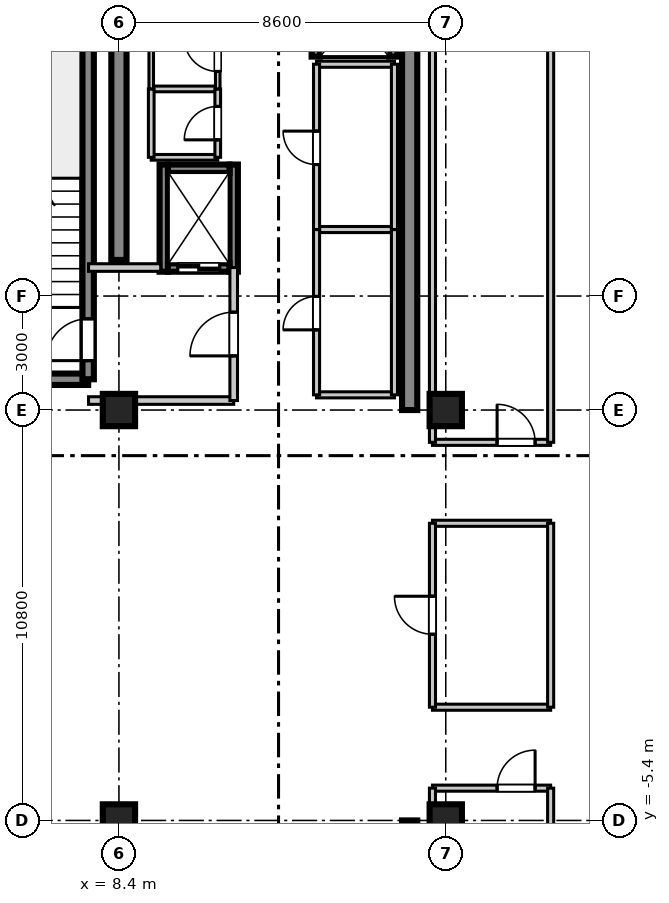
"""IFC4 building model, lengths in metres.
Left out: names, types, materials, properties, quantities, classifications, styles, units other than length and angle.
Written with IfcOpenShell. Run it as: python <this file> out.ifc"""

import sys

from ifc_helpers import new_model, si_unit, direction, frame, frame_2d, origin, origin_2d, place, context, subcontext, project, spatial, rectangle, extrude, source, transform, mapped, element, fill, save


model = new_model("IFC4")
c1 = context("Model", 3, precision=1e-05, world=origin(), true_north=direction((0.0, 1.0)))
c2 = subcontext(c1, "Body", "Model", "MODEL_VIEW")
j1 = project(units=[si_unit("LENGTHUNIT", "METRE"), si_unit("PLANEANGLEUNIT", "RADIAN")], contexts=[c1])
p1 = place(None, origin())
s1 = spatial("IfcSite", under=j1, at=p1, CompositionType="ELEMENT")
p2 = place(p1, origin())
s2 = spatial("IfcBuilding", under=s1, at=p2, CompositionType="ELEMENT")
p3 = place(p2, frame((0.0, 0.0, 334.75)))
s3 = spatial("IfcBuildingStorey", under=s2, at=p3, CompositionType="ELEMENT", Elevation=334.75)
m1 = source(origin(), c2, "Body", "SweptSolid", [
    extrude(rectangle(XDim=0.85, YDim=0.85, at=origin_2d()), origin(), (0.0, 0.0, 1.0), 3.755),
])
for number, where, z_axis, x_axis in (
    (1, (8.4, -5.4, 0.0), (0.0, 0.0, 1.0), (1.0, 0.0, 0.0)),
    (2, (8.4, 5.4, 0.0), (0.0, 0.0, 1.0), (1.0, 0.0, 0.0)),
    (3, (17.0, -5.4, 0.0), (0.0, 0.0, 1.0), (1.0, 0.0, 0.0)),
    (4, (17.0, 5.4, 0.0), (0.0, 0.0, 1.0), (1.0, 0.0, 0.0)),
):
    element("IfcColumn", number, at=place(p3, frame(where, z_axis=z_axis, x_axis=x_axis)), inside=s3, PredefinedType="PILASTER", context=c2, shape_type="MappedRepresentation", body=[
        mapped(m1, transform((0.0, 0.0, 0.0), scale=1.0)),
    ])
m2 = source(origin(), c2, "Body", "SweptSolid", [
    extrude(rectangle(XDim=7.65, YDim=0.4, at=frame_2d((3.825, 0.0))), origin(), (0.0, 0.0, 1.0), 3.47),
])
p4 = place(p3, frame((8.4, 9.35, 0.0), z_axis=(0.0, 0.0, 1.0), x_axis=(0.0, 1.0, 0.0)))
e5 = element("IfcWall", 5, at=p4, inside=s3, PredefinedType="SHEAR", context=c2, shape_type="MappedRepresentation", body=[
    mapped(m2, transform((0.0, 0.0, 0.0), scale=1.0)),
])
m3 = source(origin(), c2, "Body", "SweptSolid", [
    extrude(rectangle(XDim=11.6, YDim=0.4, at=frame_2d((5.8, 0.0))), origin(), (0.0, 0.0, 1.0), 3.47),
])
for number, where, z_axis, x_axis in (
    (6, (16.05, 5.4, 0.0), (0.0, 0.0, 1.0), (0.0, 1.0, 0.0)),
    (7, (16.05, -17.0, 0.0), (0.0, 0.0, 1.0), (0.0, 1.0, 0.0)),
):
    element("IfcWall", number, at=place(p3, frame(where, z_axis=z_axis, x_axis=x_axis)), inside=s3, PredefinedType="SHEAR", context=c2, shape_type="MappedRepresentation", body=[
        mapped(m3, transform((0.0, 0.0, 0.0), scale=1.0)),
    ])
m4 = source(origin(), c2, "Body", "SweptSolid", [
    extrude(rectangle(XDim=3.98, YDim=0.3, at=frame_2d((1.99, 0.0))), origin(), (0.0, 0.0, 1.0), 3.47),
])
p5 = place(p3, frame((3.61, 6.21, 0.0), z_axis=(0.0, 0.0, 1.0), x_axis=(1.0, 0.0, 0.0)))
e8 = element("IfcWall", 8, at=p5, inside=s3, PredefinedType="SHEAR", context=c2, shape_type="MappedRepresentation", body=[
    mapped(m4, transform((0.0, 0.0, 0.0), scale=1.0)),
])
m5 = source(origin(), c2, "Body", "SweptSolid", [
    extrude(rectangle(XDim=9.38, YDim=0.3, at=frame_2d((4.69, 0.0))), origin(), (0.0, 0.0, 1.0), 3.47),
])
p6 = place(p3, frame((7.59, 6.21, 0.0), z_axis=(0.0, 0.0, 1.0), x_axis=(0.0, 1.0, 0.0)))
e9 = element("IfcWall", 9, at=p6, inside=s3, PredefinedType="SHEAR", context=c2, shape_type="MappedRepresentation", body=[
    mapped(m5, transform((0.0, 0.0, 0.0), scale=1.0)),
])
p7 = place(p6, frame((0.49, 0.0, 0.0)))
e10 = element("IfcOpeningElement", 10, at=p7, cuts=e9, PredefinedType="OPENING", context=c2, shape_type="SweptSolid", body=[
    extrude(rectangle(XDim=1.1, YDim=2.15, at=frame_2d((0.55, 1.075))), frame((0.0, 0.16, 0.0), z_axis=(0.0, -1.0, 0.0), x_axis=(1.0, 0.0, 0.0)), (0.0, 0.0, 1.0), 0.32),
])
m6 = source(origin(), c2, "Body", "SweptSolid", [
    extrude(rectangle(XDim=2.82, YDim=0.22, at=frame_2d((1.41, 0.0))), origin(), (0.0, 0.0, 1.0), 3.47),
])
for number, where, z_axis, x_axis in (
    (11, (9.58, 9.04, 0.0), (0.0, 0.0, 1.0), (0.0, 1.0, 0.0)),
    (12, (11.42, 9.04, 0.0), (0.0, 0.0, 1.0), (0.0, 1.0, 0.0)),
):
    element("IfcWall", number, at=place(p3, frame(where, z_axis=z_axis, x_axis=x_axis)), inside=s3, PredefinedType="SHEAR", context=c2, shape_type="MappedRepresentation", body=[
        mapped(m6, transform((0.0, 0.0, 0.0), scale=1.0)),
    ])
m7 = source(origin(), c2, "Body", "SweptSolid", [
    extrude(rectangle(XDim=1.62, YDim=0.22, at=frame_2d((0.81, 0.0))), origin(), (0.0, 0.0, 1.0), 3.47),
])
p8 = place(p3, frame((9.69, 9.15, 0.0), z_axis=(0.0, 0.0, 1.0), x_axis=(1.0, 0.0, 0.0)))
e13 = element("IfcWall", 13, at=p8, inside=s3, PredefinedType="SHEAR", context=c2, shape_type="MappedRepresentation", body=[
    mapped(m7, transform((0.0, 0.0, 0.0), scale=1.0)),
])
p9 = place(p8, frame((0.26, 0.0, 0.0)))
e14 = element("IfcOpeningElement", 14, at=p9, cuts=e13, PredefinedType="OPENING", context=c2, shape_type="SweptSolid", body=[
    extrude(rectangle(XDim=1.1, YDim=2.2, at=frame_2d((0.55, 1.1))), frame((0.0, 0.12, 0.0), z_axis=(0.0, -1.0, 0.0), x_axis=(1.0, 0.0, 0.0)), (0.0, 0.0, 1.0), 0.24),
])
p10 = place(p3, frame((9.69, 11.75, 0.0), z_axis=(0.0, 0.0, 1.0), x_axis=(1.0, 0.0, 0.0)))
e15 = element("IfcWall", 15, at=p10, inside=s3, PredefinedType="SHEAR", context=c2, shape_type="MappedRepresentation", body=[
    mapped(m7, transform((0.0, 0.0, 0.0), scale=1.0)),
])
m8 = source(origin(), c2, "Body", "SweptSolid", [
    extrude(rectangle(XDim=2.61, YDim=0.22, at=frame_2d((1.305, 0.0))), origin(), (0.0, 0.0, 1.0), 3.47),
])
p11 = place(p3, frame((13.58, 14.7, 0.0), z_axis=(0.0, 0.0, 1.0), x_axis=(0.0, 1.0, 0.0)))
e16 = element("IfcWall", 16, at=p11, inside=s3, PredefinedType="SHEAR", context=c2, shape_type="MappedRepresentation", body=[
    mapped(m8, transform((0.0, 0.0, 0.0), scale=1.0)),
])
p12 = place(p11, frame((0.6, 0.0, 0.0)))
e17 = element("IfcOpeningElement", 17, at=p12, cuts=e16, PredefinedType="OPENING", context=c2, shape_type="SweptSolid", body=[
    extrude(rectangle(XDim=1.2, YDim=2.2, at=frame_2d((0.6, 1.1))), frame((0.0, 0.12, 0.0), z_axis=(0.0, -1.0, 0.0), x_axis=(1.0, 0.0, 0.0)), (0.0, 0.0, 1.0), 0.24),
])
p13 = place(p3, frame((15.62, 14.7, 0.0), z_axis=(0.0, 0.0, 1.0), x_axis=(0.0, 1.0, 0.0)))
e18 = element("IfcWall", 18, at=p13, inside=s3, PredefinedType="SHEAR", context=c2, shape_type="MappedRepresentation", body=[
    mapped(m8, transform((0.0, 0.0, 0.0), scale=1.0)),
])
m9 = source(origin(), c2, "Body", "SweptSolid", [
    extrude(rectangle(XDim=3.82, YDim=0.2, at=frame_2d((1.91, 0.0))), origin(), (0.0, 0.0, 1.0), 2.81),
])
p14 = place(p3, frame((7.6, 5.65, 0.0), z_axis=(0.0, 0.0, 1.0), x_axis=(1.0, 0.0, 0.0)))
e19 = element("IfcWall", 19, at=p14, inside=s3, PredefinedType="PARTITIONING", context=c2, shape_type="MappedRepresentation", body=[
    mapped(m9, transform((0.0, 0.0, 0.0), scale=1.0)),
])
m10 = source(origin(), c2, "Body", "SweptSolid", [
    extrude(rectangle(XDim=1.9, YDim=0.2, at=frame_2d((0.95, 0.0))), origin(), (0.0, 0.0, 1.0), 2.81),
])
p15 = place(p3, frame((7.6, 9.15, 0.0), z_axis=(0.0, 0.0, 1.0), x_axis=(1.0, 0.0, 0.0)))
e20 = element("IfcWall", 20, at=p15, inside=s3, PredefinedType="PARTITIONING", context=c2, shape_type="MappedRepresentation", body=[
    mapped(m10, transform((0.0, 0.0, 0.0), scale=1.0)),
])
m11 = source(origin(), c2, "Body", "SweptSolid", [
    extrude(rectangle(XDim=3.5, YDim=0.2, at=frame_2d((1.75, 0.0))), origin(), (0.0, 0.0, 1.0), 2.81),
])
p16 = place(p3, frame((11.42, 5.65, 0.0), z_axis=(0.0, 0.0, 1.0), x_axis=(0.0, 1.0, 0.0)))
e21 = element("IfcWall", 21, at=p16, inside=s3, PredefinedType="PARTITIONING", context=c2, shape_type="MappedRepresentation", body=[
    mapped(m11, transform((0.0, 0.0, 0.0), scale=1.0)),
])
p17 = place(p16, frame((1.175, 0.0, 0.0)))
e22 = element("IfcOpeningElement", 22, at=p17, cuts=e21, PredefinedType="OPENING", context=c2, shape_type="SweptSolid", body=[
    extrude(rectangle(XDim=1.15, YDim=2.15, at=frame_2d((0.575, 1.075))), frame((0.0, 0.11, 0.0), z_axis=(0.0, -1.0, 0.0), x_axis=(1.0, 0.0, 0.0)), (0.0, 0.0, 1.0), 0.22),
])
m12 = source(origin(), c2, "Body", "SweptSolid", [
    extrude(rectangle(XDim=1.75, YDim=0.15, at=frame_2d((0.875, 0.0))), origin(), (0.0, 0.0, 1.0), 2.81),
])
for number, where, z_axis, x_axis in (
    (23, (9.25, 12.05, 0.0), (0.0, 0.0, 1.0), (1.0, 0.0, 0.0)),
    (24, (9.25, 13.85, 0.0), (0.0, 0.0, 1.0), (1.0, 0.0, 0.0)),
):
    element("IfcWall", number, at=place(p3, frame(where, z_axis=z_axis, x_axis=x_axis)), inside=s3, PredefinedType="PARTITIONING", context=c2, shape_type="MappedRepresentation", body=[
        mapped(m12, transform((0.0, 0.0, 0.0), scale=1.0)),
    ])
m13 = source(origin(), c2, "Body", "SweptSolid", [
    extrude(rectangle(XDim=1.8, YDim=0.15, at=frame_2d((0.9, 0.0))), origin(), (0.0, 0.0, 1.0), 2.81),
])
p18 = place(p3, frame((9.25, 12.05, 0.0), z_axis=(0.0, 0.0, 1.0), x_axis=(0.0, 1.0, 0.0)))
e25 = element("IfcWall", 25, at=p18, inside=s3, PredefinedType="PARTITIONING", context=c2, shape_type="MappedRepresentation", body=[
    mapped(m13, transform((0.0, 0.0, 0.0), scale=1.0)),
])
p19 = place(p3, frame((11.0, 12.05, 0.0), z_axis=(0.0, 0.0, 1.0), x_axis=(0.0, 1.0, 0.0)))
e26 = element("IfcWall", 26, at=p19, inside=s3, PredefinedType="PARTITIONING", context=c2, shape_type="MappedRepresentation", body=[
    mapped(m13, transform((0.0, 0.0, 0.0), scale=1.0)),
])
p20 = place(p19, frame((0.46, 0.0, 0.0)))
e27 = element("IfcOpeningElement", 27, at=p20, cuts=e26, PredefinedType="OPENING", context=c2, shape_type="SweptSolid", body=[
    extrude(rectangle(XDim=0.88, YDim=2.1, at=frame_2d((0.44, 1.05))), frame((0.0, 0.085, 0.0), z_axis=(0.0, -1.0, 0.0), x_axis=(1.0, 0.0, 0.0)), (0.0, 0.0, 1.0), 0.17),
])
m14 = source(origin(), c2, "Body", "SweptSolid", [
    extrude(rectangle(XDim=1.8, YDim=0.12, at=frame_2d((0.9, 0.0))), origin(), (0.0, 0.0, 1.0), 2.81),
])
p21 = place(p3, frame((9.25, 13.85, 0.0), z_axis=(0.0, 0.0, 1.0), x_axis=(0.0, 1.0, 0.0)))
e28 = element("IfcWall", 28, at=p21, inside=s3, PredefinedType="PARTITIONING", context=c2, shape_type="MappedRepresentation", body=[
    mapped(m14, transform((0.0, 0.0, 0.0), scale=1.0)),
])
p22 = place(p3, frame((11.0, 13.85, 0.0), z_axis=(0.0, 0.0, 1.0), x_axis=(0.0, 1.0, 0.0)))
e29 = element("IfcWall", 29, at=p22, inside=s3, PredefinedType="PARTITIONING", context=c2, shape_type="MappedRepresentation", body=[
    mapped(m14, transform((0.0, 0.0, 0.0), scale=1.0)),
])
p23 = place(p22, frame((0.46, 0.0, 0.0)))
e30 = element("IfcOpeningElement", 30, at=p23, cuts=e29, PredefinedType="OPENING", context=c2, shape_type="SweptSolid", body=[
    extrude(rectangle(XDim=0.88, YDim=2.1, at=frame_2d((0.44, 1.05))), frame((0.0, 0.07, 0.0), z_axis=(0.0, -1.0, 0.0), x_axis=(1.0, 0.0, 0.0)), (0.0, 0.0, 1.0), 0.14),
])
m15 = source(origin(), c2, "Body", "SweptSolid", [
    extrude(rectangle(XDim=2.05, YDim=0.16, at=frame_2d((1.025, 0.0))), origin(), (0.0, 0.0, 1.0), 2.81),
])
for number, where, z_axis, x_axis in (
    (31, (13.6, 5.8, 0.0), (0.0, 0.0, 1.0), (1.0, 0.0, 0.0)),
    (32, (13.6, 10.15, 0.0), (0.0, 0.0, 1.0), (1.0, 0.0, 0.0)),
):
    element("IfcWall", number, at=place(p3, frame(where, z_axis=z_axis, x_axis=x_axis)), inside=s3, PredefinedType="PARTITIONING", context=c2, shape_type="MappedRepresentation", body=[
        mapped(m15, transform((0.0, 0.0, 0.0), scale=1.0)),
    ])
m16 = source(origin(), c2, "Body", "SweptSolid", [
    extrude(rectangle(XDim=4.35, YDim=0.16, at=frame_2d((2.175, 0.0))), origin(), (0.0, 0.0, 1.0), 2.81),
])
p24 = place(p3, frame((13.6, 5.8, 0.0), z_axis=(0.0, 0.0, 1.0), x_axis=(0.0, 1.0, 0.0)))
e33 = element("IfcWall", 33, at=p24, inside=s3, PredefinedType="PARTITIONING", context=c2, shape_type="MappedRepresentation", body=[
    mapped(m16, transform((0.0, 0.0, 0.0), scale=1.0)),
])
p25 = place(p24, frame((1.71, 0.0, 0.0)))
e34 = element("IfcOpeningElement", 34, at=p25, cuts=e33, PredefinedType="OPENING", context=c2, shape_type="SweptSolid", body=[
    extrude(rectangle(XDim=0.88, YDim=2.1, at=frame_2d((0.44, 1.05))), frame((0.0, 0.09, 0.0), z_axis=(0.0, -1.0, 0.0), x_axis=(1.0, 0.0, 0.0)), (0.0, 0.0, 1.0), 0.18),
])
p26 = place(p3, frame((15.65, 5.8, 0.0), z_axis=(0.0, 0.0, 1.0), x_axis=(0.0, 1.0, 0.0)))
e35 = element("IfcWall", 35, at=p26, inside=s3, PredefinedType="PARTITIONING", context=c2, shape_type="MappedRepresentation", body=[
    mapped(m16, transform((0.0, 0.0, 0.0), scale=1.0)),
])
p27 = place(p3, frame((13.6, 14.5, 0.0), z_axis=(0.0, 0.0, 1.0), x_axis=(1.0, 0.0, 0.0)))
e36 = element("IfcWall", 36, at=p27, inside=s3, PredefinedType="PARTITIONING", context=c2, shape_type="MappedRepresentation", body=[
    mapped(m15, transform((0.0, 0.0, 0.0), scale=1.0)),
])
m17 = source(origin(), c2, "Body", "SweptSolid", [
    extrude(rectangle(XDim=4.35, YDim=0.16, at=frame_2d((2.175, 0.0))), origin(), (0.0, 0.0, 1.0), 2.81),
])
p28 = place(p3, frame((13.6, 10.15, 0.0), z_axis=(0.0, 0.0, 1.0), x_axis=(0.0, 1.0, 0.0)))
e37 = element("IfcWall", 37, at=p28, inside=s3, PredefinedType="PARTITIONING", context=c2, shape_type="MappedRepresentation", body=[
    mapped(m17, transform((0.0, 0.0, 0.0), scale=1.0)),
])
p29 = place(p28, frame((1.71, 0.0, 0.0)))
e38 = element("IfcOpeningElement", 38, at=p29, cuts=e37, PredefinedType="OPENING", context=c2, shape_type="SweptSolid", body=[
    extrude(rectangle(XDim=0.88, YDim=2.1, at=frame_2d((0.44, 1.05))), frame((0.0, 0.09, 0.0), z_axis=(0.0, -1.0, 0.0), x_axis=(1.0, 0.0, 0.0)), (0.0, 0.0, 1.0), 0.18),
])
p30 = place(p3, frame((15.65, 10.15, 0.0), z_axis=(0.0, 0.0, 1.0), x_axis=(0.0, 1.0, 0.0)))
e39 = element("IfcWall", 39, at=p30, inside=s3, PredefinedType="PARTITIONING", context=c2, shape_type="MappedRepresentation", body=[
    mapped(m17, transform((0.0, 0.0, 0.0), scale=1.0)),
])
m18 = source(origin(), c2, "Body", "SweptSolid", [
    extrude(rectangle(XDim=3.11, YDim=0.16, at=frame_2d((1.555, 0.0))), origin(), (0.0, 0.0, 1.0), 2.81),
])
p31 = place(p3, frame((16.65, 4.55, 0.0), z_axis=(0.0, 0.0, 1.0), x_axis=(1.0, 0.0, 0.0)))
e40 = element("IfcWall", 40, at=p31, inside=s3, PredefinedType="PARTITIONING", context=c2, shape_type="MappedRepresentation", body=[
    mapped(m18, transform((0.0, 0.0, 0.0), scale=1.0)),
])
p32 = place(p31, frame((1.701, 0.0, 0.0)))
e41 = element("IfcOpeningElement", 41, at=p32, cuts=e40, PredefinedType="OPENING", context=c2, shape_type="SweptSolid", body=[
    extrude(rectangle(XDim=1.0, YDim=2.1, at=frame_2d((0.5, 1.05))), frame((0.0, 0.09, 0.0), z_axis=(0.0, -1.0, 0.0), x_axis=(1.0, 0.0, 0.0)), (0.0, 0.0, 1.0), 0.18),
])
m19 = source(origin(), c2, "Body", "SweptSolid", [
    extrude(rectangle(XDim=17.95, YDim=0.16, at=frame_2d((8.975, 0.0))), origin(), (0.0, 0.0, 1.0), 2.81),
])
p33 = place(p3, frame((16.65, 4.55, 0.0), z_axis=(0.0, 0.0, 1.0), x_axis=(0.0, 1.0, 0.0)))
e42 = element("IfcWall", 42, at=p33, inside=s3, PredefinedType="PARTITIONING", context=c2, shape_type="MappedRepresentation", body=[
    mapped(m19, transform((0.0, 0.0, 0.0), scale=1.0)),
])
m20 = source(origin(), c2, "Body", "SweptSolid", [
    extrude(rectangle(XDim=16.53, YDim=0.16, at=frame_2d((8.265, 0.0))), origin(), (0.0, 0.0, 1.0), 2.81),
])
p34 = place(p3, frame((19.76, 4.55, 0.0), z_axis=(0.0, 0.0, 1.0), x_axis=(0.0, 1.0, 0.0)))
e43 = element("IfcWall", 43, at=p34, inside=s3, PredefinedType="PARTITIONING", context=c2, shape_type="MappedRepresentation", body=[
    mapped(m20, transform((0.0, 0.0, 0.0), scale=1.0)),
])
p35 = place(p3, frame((16.65, -4.55, 0.0), z_axis=(0.0, 0.0, 1.0), x_axis=(1.0, 0.0, 0.0)))
e44 = element("IfcWall", 44, at=p35, inside=s3, PredefinedType="PARTITIONING", context=c2, shape_type="MappedRepresentation", body=[
    mapped(m18, transform((0.0, 0.0, 0.0), scale=1.0)),
])
p36 = place(p35, frame((1.701, 0.0, 0.0)))
e45 = element("IfcOpeningElement", 45, at=p36, cuts=e44, PredefinedType="OPENING", context=c2, shape_type="SweptSolid", body=[
    extrude(rectangle(XDim=1.0, YDim=2.1, at=frame_2d((0.5, 1.05))), frame((0.0, 0.09, 0.0), z_axis=(0.0, -1.0, 0.0), x_axis=(1.0, 0.0, 0.0)), (0.0, 0.0, 1.0), 0.18),
])
p37 = place(p3, frame((16.65, -22.5, 0.0), z_axis=(0.0, 0.0, 1.0), x_axis=(0.0, 1.0, 0.0)))
e46 = element("IfcWall", 46, at=p37, inside=s3, PredefinedType="PARTITIONING", context=c2, shape_type="MappedRepresentation", body=[
    mapped(m19, transform((0.0, 0.0, 0.0), scale=1.0)),
])
p38 = place(p3, frame((19.76, -21.08, 0.0), z_axis=(0.0, 0.0, 1.0), x_axis=(0.0, 1.0, 0.0)))
e47 = element("IfcWall", 47, at=p38, inside=s3, PredefinedType="PARTITIONING", context=c2, shape_type="MappedRepresentation", body=[
    mapped(m20, transform((0.0, 0.0, 0.0), scale=1.0)),
])
for number, where, z_axis, x_axis in (
    (48, (16.65, -2.42, 0.0), (0.0, 0.0, 1.0), (1.0, 0.0, 0.0)),
    (49, (16.65, 2.42, 0.0), (0.0, 0.0, 1.0), (1.0, 0.0, 0.0)),
):
    element("IfcWall", number, at=place(p3, frame(where, z_axis=z_axis, x_axis=x_axis)), inside=s3, PredefinedType="PARTITIONING", context=c2, shape_type="MappedRepresentation", body=[
        mapped(m18, transform((0.0, 0.0, 0.0), scale=1.0)),
    ])
m21 = source(origin(), c2, "Body", "SweptSolid", [
    extrude(rectangle(XDim=4.84, YDim=0.16, at=frame_2d((2.42, 0.0))), origin(), (0.0, 0.0, 1.0), 2.81),
])
p39 = place(p3, frame((16.65, -2.42, 0.0), z_axis=(0.0, 0.0, 1.0), x_axis=(0.0, 1.0, 0.0)))
e50 = element("IfcWall", 50, at=p39, inside=s3, PredefinedType="PARTITIONING", context=c2, shape_type="MappedRepresentation", body=[
    mapped(m21, transform((0.0, 0.0, 0.0), scale=1.0)),
])
p40 = place(p39, frame((1.92, 0.0, 0.0)))
e51 = element("IfcOpeningElement", 51, at=p40, cuts=e50, PredefinedType="OPENING", context=c2, shape_type="SweptSolid", body=[
    extrude(rectangle(XDim=1.0, YDim=2.1, at=frame_2d((0.5, 1.05))), frame((0.0, 0.09, 0.0), z_axis=(0.0, -1.0, 0.0), x_axis=(1.0, 0.0, 0.0)), (0.0, 0.0, 1.0), 0.18),
])
p41 = place(p3, frame((19.76, -2.42, 0.0), z_axis=(0.0, 0.0, 1.0), x_axis=(0.0, 1.0, 0.0)))
e52 = element("IfcWall", 52, at=p41, inside=s3, PredefinedType="PARTITIONING", context=c2, shape_type="MappedRepresentation", body=[
    mapped(m21, transform((0.0, 0.0, 0.0), scale=1.0)),
])
m22 = source(origin(), c2, "Body", "SweptSolid", [
    extrude(rectangle(XDim=1.1, YDim=2.15, at=frame_2d((0.55, 1.075))), frame((0.0, 0.025, 0.0), z_axis=(0.0, -1.0, 0.0), x_axis=(1.0, 0.0, 0.0)), (0.0, 0.0, 1.0), 0.05),
])
p42 = place(p7, origin())
e53 = element("IfcDoor", 53, at=p42, inside=s3, OperationType="SINGLE_SWING_LEFT", PredefinedType="DOOR", context=c2, shape_type="MappedRepresentation", body=[
    mapped(m22, transform((0.0, 0.0, 0.0), scale=1.0)),
])
fill(e10, e53)
m23 = source(origin(), c2, "Body", "SweptSolid", [
    extrude(rectangle(XDim=1.1, YDim=2.2, at=frame_2d((0.55, 1.1))), frame((0.0, 0.025, 0.0), z_axis=(0.0, -1.0, 0.0), x_axis=(1.0, 0.0, 0.0)), (0.0, 0.0, 1.0), 0.05),
])
p43 = place(p9, frame((1.1, 0.0, 0.0), z_axis=(0.0, 0.0, 1.0), x_axis=(-1.0, 0.0, 0.0)))
e54 = element("IfcDoor", 54, at=p43, inside=s3, OperationType="DOUBLE_DOOR_SLIDING", PredefinedType="DOOR", context=c2, shape_type="MappedRepresentation", body=[
    mapped(m23, transform((0.0, 0.0, 0.0), scale=1.0)),
])
fill(e14, e54)
m24 = source(origin(), c2, "Body", "SweptSolid", [
    extrude(rectangle(XDim=1.15, YDim=2.15, at=frame_2d((0.575, 1.075))), frame((0.0, 0.025, 0.0), z_axis=(0.0, -1.0, 0.0), x_axis=(1.0, 0.0, 0.0)), (0.0, 0.0, 1.0), 0.05),
])
p44 = place(p17, frame((1.15, 0.0, 0.0), z_axis=(0.0, 0.0, 1.0), x_axis=(-1.0, 0.0, 0.0)))
e55 = element("IfcDoor", 55, at=p44, inside=s3, OperationType="SINGLE_SWING_LEFT", PredefinedType="DOOR", context=c2, shape_type="MappedRepresentation", body=[
    mapped(m24, transform((0.0, 0.0, 0.0), scale=1.0)),
])
fill(e22, e55)
m25 = source(origin(), c2, "Body", "SweptSolid", [
    extrude(rectangle(XDim=0.88, YDim=2.1, at=frame_2d((0.44, 1.05))), frame((0.0, 0.025, 0.0), z_axis=(0.0, -1.0, 0.0), x_axis=(1.0, 0.0, 0.0)), (0.0, 0.0, 1.0), 0.05),
])
p45 = place(p20, origin())
e56 = element("IfcDoor", 56, at=p45, inside=s3, OperationType="SINGLE_SWING_LEFT", PredefinedType="DOOR", context=c2, shape_type="MappedRepresentation", body=[
    mapped(m25, transform((0.0, 0.0, 0.0), scale=1.0)),
])
fill(e27, e56)
p46 = place(p23, origin())
e57 = element("IfcDoor", 57, at=p46, inside=s3, OperationType="SINGLE_SWING_RIGHT", PredefinedType="DOOR", context=c2, shape_type="MappedRepresentation", body=[
    mapped(m25, transform((0.0, 0.0, 0.0), scale=1.0)),
])
fill(e30, e57)
p47 = place(p25, frame((0.88, 0.0, 0.0), z_axis=(0.0, 0.0, 1.0), x_axis=(-1.0, 0.0, 0.0)))
e58 = element("IfcDoor", 58, at=p47, inside=s3, OperationType="SINGLE_SWING_LEFT", PredefinedType="DOOR", context=c2, shape_type="MappedRepresentation", body=[
    mapped(m25, transform((0.0, 0.0, 0.0), scale=1.0)),
])
fill(e34, e58)
p48 = place(p29, frame((0.88, 0.0, 0.0), z_axis=(0.0, 0.0, 1.0), x_axis=(-1.0, 0.0, 0.0)))
e59 = element("IfcDoor", 59, at=p48, inside=s3, OperationType="SINGLE_SWING_RIGHT", PredefinedType="DOOR", context=c2, shape_type="MappedRepresentation", body=[
    mapped(m25, transform((0.0, 0.0, 0.0), scale=1.0)),
])
fill(e38, e59)
m26 = source(origin(), c2, "Body", "SweptSolid", [
    extrude(rectangle(XDim=1.0, YDim=2.1, at=frame_2d((0.5, 1.05))), frame((0.0, 0.025, 0.0), z_axis=(0.0, -1.0, 0.0), x_axis=(1.0, 0.0, 0.0)), (0.0, 0.0, 1.0), 0.05),
])
p49 = place(p32, origin())
e60 = element("IfcDoor", 60, at=p49, inside=s3, OperationType="SINGLE_SWING_LEFT", PredefinedType="DOOR", context=c2, shape_type="MappedRepresentation", body=[
    mapped(m26, transform((0.0, 0.0, 0.0), scale=1.0)),
])
fill(e41, e60)
p50 = place(p36, frame((1.0, 0.0, 0.0), z_axis=(0.0, 0.0, 1.0), x_axis=(-1.0, 0.0, 0.0)))
e61 = element("IfcDoor", 61, at=p50, inside=s3, OperationType="SINGLE_SWING_RIGHT", PredefinedType="DOOR", context=c2, shape_type="MappedRepresentation", body=[
    mapped(m26, transform((0.0, 0.0, 0.0), scale=1.0)),
])
fill(e45, e61)
p51 = place(p40, frame((1.0, 0.0, 0.0), z_axis=(0.0, 0.0, 1.0), x_axis=(-1.0, 0.0, 0.0)))
e62 = element("IfcDoor", 62, at=p51, inside=s3, OperationType="SINGLE_SWING_RIGHT", PredefinedType="DOOR", context=c2, shape_type="MappedRepresentation", body=[
    mapped(m26, transform((0.0, 0.0, 0.0), scale=1.0)),
])
fill(e51, e62)
save(model, sys.argv[1])
